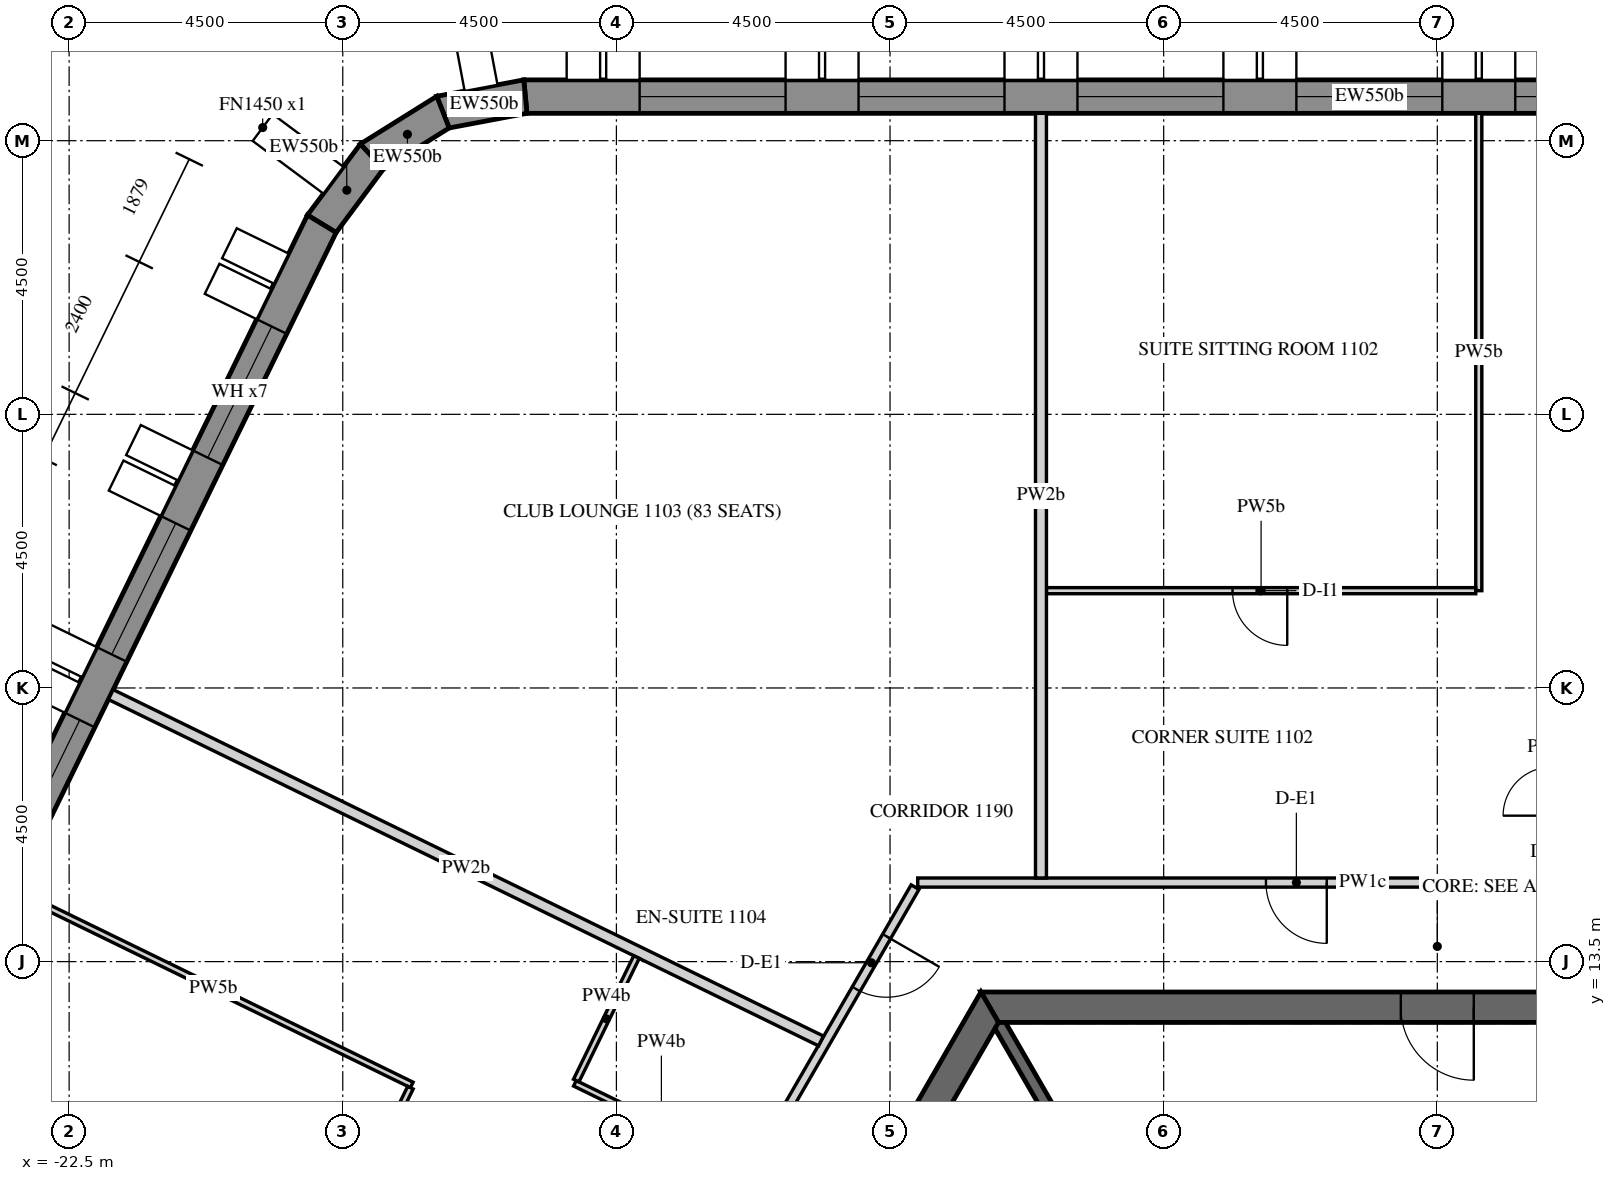
"""IFC4 building model, lengths in metres.
Left out: names, types, materials, properties, quantities, classifications, styles, units other than length and angle.
Written with IfcOpenShell. Run it as: python <this file> out.ifc"""

import sys

from ifc_helpers import new_model, si_unit, direction, frame, frame_2d, origin, place, context, subcontext, project, spatial, polyline, rectangle, outline, extrude, element, fill, save


model = new_model("IFC4")
c1 = context("Model", 3, precision=1e-05, world=origin(), true_north=direction((0.0, 1.0)))
c2 = subcontext(c1, "Body", "Model", "MODEL_VIEW")
j1 = project(units=[si_unit("LENGTHUNIT", "METRE"), si_unit("PLANEANGLEUNIT", "RADIAN")], contexts=[c1])
p1 = place(None, origin())
s1 = spatial("IfcSite", under=j1, at=p1, CompositionType="ELEMENT")
p2 = place(p1, origin())
s2 = spatial("IfcBuilding", under=s1, at=p2, CompositionType="ELEMENT")
p3 = place(p2, frame((0.0, 0.0, 152.7)))
s3 = spatial("IfcBuildingStorey", under=s2, at=p3, CompositionType="ELEMENT", Elevation=152.7)
p4 = place(p3, frame((12.761, 27.725, 0.0), z_axis=(0.0, 0.0, 1.0), x_axis=(-1.0, 0.0, 0.0)))
e1 = element("IfcWall", 1, at=p4, inside=s3, PredefinedType="SOLIDWALL", context=c2, shape_type="SweptSolid", body=[
    extrude(outline(polyline([(-0.022, -0.275), (27.783, -0.275), (27.732, 0.275), (0.022, 0.275), (-0.022, -0.275)])), origin(), (0.0, 0.0, 1.0), 3.75),
])
p5 = place(p4, frame((1.879, 0.0, 0.9)))
e2 = element("IfcOpeningElement", 2, at=p5, cuts=e1, PredefinedType="OPENING", context=c2, shape_type="SweptSolid", body=[
    extrude(rectangle(XDim=2.4, YDim=2.4, at=frame_2d((1.2, 1.2))), frame((0.0, 0.285, 0.0), z_axis=(0.0, -1.0, 0.0), x_axis=(1.0, 0.0, 0.0)), (0.0, 0.0, 1.0), 0.57),
])
p6 = place(p4, frame((5.479, 0.0, 0.9)))
e3 = element("IfcOpeningElement", 3, at=p6, cuts=e1, PredefinedType="OPENING", context=c2, shape_type="SweptSolid", body=[
    extrude(rectangle(XDim=2.4, YDim=2.4, at=frame_2d((1.2, 1.2))), frame((0.0, 0.285, 0.0), z_axis=(0.0, -1.0, 0.0), x_axis=(1.0, 0.0, 0.0)), (0.0, 0.0, 1.0), 0.57),
])
p7 = place(p4, frame((9.079, 0.0, 0.9)))
e4 = element("IfcOpeningElement", 4, at=p7, cuts=e1, PredefinedType="OPENING", context=c2, shape_type="SweptSolid", body=[
    extrude(rectangle(XDim=2.4, YDim=2.4, at=frame_2d((1.2, 1.2))), frame((0.0, 0.285, 0.0), z_axis=(0.0, -1.0, 0.0), x_axis=(1.0, 0.0, 0.0)), (0.0, 0.0, 1.0), 0.57),
])
p8 = place(p4, frame((12.679, 0.0, 0.9)))
e5 = element("IfcOpeningElement", 5, at=p8, cuts=e1, PredefinedType="OPENING", context=c2, shape_type="SweptSolid", body=[
    extrude(rectangle(XDim=2.4, YDim=2.4, at=frame_2d((1.2, 1.2))), frame((0.0, 0.285, 0.0), z_axis=(0.0, -1.0, 0.0), x_axis=(1.0, 0.0, 0.0)), (0.0, 0.0, 1.0), 0.57),
])
p9 = place(p4, frame((16.279, 0.0, 0.9)))
e6 = element("IfcOpeningElement", 6, at=p9, cuts=e1, PredefinedType="OPENING", context=c2, shape_type="SweptSolid", body=[
    extrude(rectangle(XDim=2.4, YDim=2.4, at=frame_2d((1.2, 1.2))), frame((0.0, 0.285, 0.0), z_axis=(0.0, -1.0, 0.0), x_axis=(1.0, 0.0, 0.0)), (0.0, 0.0, 1.0), 0.57),
])
p10 = place(p4, frame((19.879, 0.0, 0.9)))
e7 = element("IfcOpeningElement", 7, at=p10, cuts=e1, PredefinedType="OPENING", context=c2, shape_type="SweptSolid", body=[
    extrude(rectangle(XDim=2.4, YDim=2.4, at=frame_2d((1.2, 1.2))), frame((0.0, 0.285, 0.0), z_axis=(0.0, -1.0, 0.0), x_axis=(1.0, 0.0, 0.0)), (0.0, 0.0, 1.0), 0.57),
])
p11 = place(p4, frame((23.479, 0.0, 0.9)))
e8 = element("IfcOpeningElement", 8, at=p11, cuts=e1, PredefinedType="OPENING", context=c2, shape_type="SweptSolid", body=[
    extrude(rectangle(XDim=2.4, YDim=2.4, at=frame_2d((1.2, 1.2))), frame((0.0, 0.285, 0.0), z_axis=(0.0, -1.0, 0.0), x_axis=(1.0, 0.0, 0.0)), (0.0, 0.0, 1.0), 0.57),
])
p12 = place(p3, frame((-14.997, 27.725, 0.0), z_axis=(0.0, 0.0, 1.0), x_axis=(-0.982705443133, -0.185175624845, 0.0)))
e9 = element("IfcWall", 9, at=p12, inside=s3, PredefinedType="SOLIDWALL", context=c2, shape_type="SweptSolid", body=[
    extrude(outline(polyline([(-0.026, -0.275), (1.431, -0.275), (1.327, 0.275), (0.026, 0.275), (-0.026, -0.275)])), origin(), (0.0, 0.0, 1.0), 3.75),
])
p13 = place(p3, frame((-16.352, 27.47, 0.0), z_axis=(0.0, 0.0, 1.0), x_axis=(-0.848057977594, -0.5299034503, 0.0)))
e10 = element("IfcWall", 10, at=p13, inside=s3, PredefinedType="SOLIDWALL", context=c2, shape_type="SweptSolid", body=[
    extrude(outline(polyline([(-0.052, -0.275), (1.431, -0.275), (1.327, 0.275), (0.052, 0.275), (-0.052, -0.275)])), origin(), (0.0, 0.0, 1.0), 3.75),
])
p14 = place(p3, frame((-17.521, 26.739, 0.0), z_axis=(0.0, 0.0, 1.0), x_axis=(-0.597135295884, -0.802140535324, 0.0)))
e11 = element("IfcWall", 11, at=p14, inside=s3, PredefinedType="SOLIDWALL", context=c2, shape_type="SweptSolid", body=[
    extrude(outline(polyline([(-0.052, -0.275), (1.405, -0.275), (1.354, 0.275), (0.052, 0.275), (-0.052, -0.275)])), origin(), (0.0, 0.0, 1.0), 3.75),
])
p15 = place(p3, frame((-18.345, 25.633, 0.0), z_axis=(0.0, 0.0, 1.0), x_axis=(-0.43837181828, -0.898793718791, 0.0)))
e12 = element("IfcWall", 12, at=p15, inside=s3, PredefinedType="SOLIDWALL", context=c2, shape_type="SweptSolid", body=[
    extrude(outline(polyline([(-0.026, -0.275), (27.78, -0.275), (27.735, 0.275), (0.026, 0.275), (-0.026, -0.275)])), origin(), (0.0, 0.0, 1.0), 3.75),
])
p16 = place(p15, frame((1.879, 0.0, 0.9)))
e13 = element("IfcOpeningElement", 13, at=p16, cuts=e12, PredefinedType="OPENING", context=c2, shape_type="SweptSolid", body=[
    extrude(rectangle(XDim=2.4, YDim=2.4, at=frame_2d((1.2, 1.2))), frame((0.0, 0.285, 0.0), z_axis=(0.0, -1.0, 0.0), x_axis=(1.0, 0.0, 0.0)), (0.0, 0.0, 1.0), 0.57),
])
p17 = place(p15, frame((5.479, 0.0, 0.9)))
e14 = element("IfcOpeningElement", 14, at=p17, cuts=e12, PredefinedType="OPENING", context=c2, shape_type="SweptSolid", body=[
    extrude(rectangle(XDim=2.4, YDim=2.4, at=frame_2d((1.2, 1.2))), frame((0.0, 0.285, 0.0), z_axis=(0.0, -1.0, 0.0), x_axis=(1.0, 0.0, 0.0)), (0.0, 0.0, 1.0), 0.57),
])
p18 = place(p15, frame((9.079, 0.0, 0.9)))
e15 = element("IfcOpeningElement", 15, at=p18, cuts=e12, PredefinedType="OPENING", context=c2, shape_type="SweptSolid", body=[
    extrude(rectangle(XDim=2.4, YDim=2.4, at=frame_2d((1.2, 1.2))), frame((0.0, 0.285, 0.0), z_axis=(0.0, -1.0, 0.0), x_axis=(1.0, 0.0, 0.0)), (0.0, 0.0, 1.0), 0.57),
])
p19 = place(p15, frame((12.679, 0.0, 0.9)))
e16 = element("IfcOpeningElement", 16, at=p19, cuts=e12, PredefinedType="OPENING", context=c2, shape_type="SweptSolid", body=[
    extrude(rectangle(XDim=2.4, YDim=2.4, at=frame_2d((1.2, 1.2))), frame((0.0, 0.285, 0.0), z_axis=(0.0, -1.0, 0.0), x_axis=(1.0, 0.0, 0.0)), (0.0, 0.0, 1.0), 0.57),
])
p20 = place(p15, frame((16.279, 0.0, 0.9)))
e17 = element("IfcOpeningElement", 17, at=p20, cuts=e12, PredefinedType="OPENING", context=c2, shape_type="SweptSolid", body=[
    extrude(rectangle(XDim=2.4, YDim=2.4, at=frame_2d((1.2, 1.2))), frame((0.0, 0.285, 0.0), z_axis=(0.0, -1.0, 0.0), x_axis=(1.0, 0.0, 0.0)), (0.0, 0.0, 1.0), 0.57),
])
p21 = place(p15, frame((19.879, 0.0, 0.9)))
e18 = element("IfcOpeningElement", 18, at=p21, cuts=e12, PredefinedType="OPENING", context=c2, shape_type="SweptSolid", body=[
    extrude(rectangle(XDim=2.4, YDim=2.4, at=frame_2d((1.2, 1.2))), frame((0.0, 0.285, 0.0), z_axis=(0.0, -1.0, 0.0), x_axis=(1.0, 0.0, 0.0)), (0.0, 0.0, 1.0), 0.57),
])
p22 = place(p15, frame((23.479, 0.0, 0.9)))
e19 = element("IfcOpeningElement", 19, at=p22, cuts=e12, PredefinedType="OPENING", context=c2, shape_type="SweptSolid", body=[
    extrude(rectangle(XDim=2.4, YDim=2.4, at=frame_2d((1.2, 1.2))), frame((0.0, 0.285, 0.0), z_axis=(0.0, -1.0, 0.0), x_axis=(1.0, 0.0, 0.0)), (0.0, 0.0, 1.0), 0.57),
])
p23 = place(p3, frame((-7.361, 12.75, 0.0), z_axis=(0.0, 0.0, 1.0), x_axis=(-0.50000571537, -0.866022103989, 0.0)))
e20 = element("IfcWall", 20, at=p23, inside=s3, PredefinedType="SHEAR", context=c2, shape_type="SweptSolid", body=[
    extrude(outline(polyline([(-0.144, -0.25), (14.867, -0.25), (14.578, 0.25), (0.144, 0.25), (-0.144, -0.25)])), origin(), (0.0, 0.0, 1.0), 3.75),
])
p24 = place(p23, frame((6.49, 0.0, 0.0)))
e21 = element("IfcOpeningElement", 21, at=p24, cuts=e20, PredefinedType="OPENING", context=c2, shape_type="SweptSolid", body=[
    extrude(rectangle(XDim=1.8, YDim=2.4, at=frame_2d((0.9, 1.2))), frame((0.0, 0.26, 0.0), z_axis=(0.0, -1.0, 0.0), x_axis=(1.0, 0.0, 0.0)), (0.0, 0.0, 1.0), 0.52),
])
p25 = place(p3, frame((7.361, 12.75, 0.0), z_axis=(0.0, 0.0, 1.0), x_axis=(-1.0, 0.0, 0.0)))
e22 = element("IfcWall", 22, at=p25, inside=s3, PredefinedType="SHEAR", context=c2, shape_type="SweptSolid", body=[
    extrude(outline(polyline([(-0.144, -0.25), (14.866, -0.25), (14.578, 0.25), (0.144, 0.25), (-0.144, -0.25)])), origin(), (0.0, 0.0, 1.0), 3.75),
])
p26 = place(p25, frame((6.761, 0.0, 0.0)))
e23 = element("IfcOpeningElement", 23, at=p26, cuts=e22, PredefinedType="OPENING", context=c2, shape_type="SweptSolid", body=[
    extrude(rectangle(XDim=1.2, YDim=2.4, at=frame_2d((0.6, 1.2))), frame((0.0, 0.26, 0.0), z_axis=(0.0, -1.0, 0.0), x_axis=(1.0, 0.0, 0.0)), (0.0, 0.0, 1.0), 0.52),
])
p27 = place(p3, frame((-5.773, 10.0, 0.0), z_axis=(0.0, 0.0, 1.0), x_axis=(-0.499995765644, 0.866027848477, 0.0)))
e24 = element("IfcWall", 24, at=p27, inside=s3, PredefinedType="SHEAR", context=c2, shape_type="SweptSolid", body=[
    extrude(rectangle(XDim=2.887, YDim=0.2, at=frame_2d((1.443, 0.0))), origin(), (0.0, 0.0, 1.0), 3.75),
])
p28 = place(p3, frame((6.091, 14.8, 0.0), z_axis=(0.0, 0.0, 1.0), x_axis=(-1.0, 0.0, 0.0)))
e25 = element("IfcWall", 25, at=p28, inside=s3, PredefinedType="PARTITIONING", context=c2, shape_type="SweptSolid", body=[
    extrude(rectangle(XDim=14.636, YDim=0.15, at=frame_2d((7.318, 0.0))), origin(), (0.0, 0.0, 1.0), 2.823),
])
p29 = place(p28, frame((7.909, 0.0, 0.0)))
e26 = element("IfcOpeningElement", 26, at=p29, cuts=e25, PredefinedType="OPENING", context=c2, shape_type="SweptSolid", body=[
    extrude(rectangle(XDim=1.0, YDim=2.1, at=frame_2d((0.5, 1.05))), frame((0.0, 0.085, 0.0), z_axis=(0.0, -1.0, 0.0), x_axis=(1.0, 0.0, 0.0)), (0.0, 0.0, 1.0), 0.17),
])
p30 = place(p3, frame((-8.588, 14.725, 0.0), z_axis=(0.0, 0.0, 1.0), x_axis=(-0.499996322767, -0.866027526826, 0.0)))
e27 = element("IfcWall", 27, at=p30, inside=s3, PredefinedType="PARTITIONING", context=c2, shape_type="SweptSolid", body=[
    extrude(rectangle(XDim=14.636, YDim=0.15, at=frame_2d((7.318, 0.0))), origin(), (0.0, 0.0, 1.0), 2.823),
])
p31 = place(p30, frame((0.936, 0.0, 0.0)))
e28 = element("IfcOpeningElement", 28, at=p31, cuts=e27, PredefinedType="OPENING", context=c2, shape_type="SweptSolid", body=[
    extrude(rectangle(XDim=1.0, YDim=2.1, at=frame_2d((0.5, 1.05))), frame((0.0, 0.085, 0.0), z_axis=(0.0, -1.0, 0.0), x_axis=(1.0, 0.0, 0.0)), (0.0, 0.0, 1.0), 0.17),
])
p32 = place(p30, frame((9.495, 0.0, 0.0)))
e29 = element("IfcOpeningElement", 29, at=p32, cuts=e27, PredefinedType="OPENING", context=c2, shape_type="SweptSolid", body=[
    extrude(rectangle(XDim=1.0, YDim=2.1, at=frame_2d((0.5, 1.05))), frame((0.0, 0.085, 0.0), z_axis=(0.0, -1.0, 0.0), x_axis=(1.0, 0.0, 0.0)), (0.0, 0.0, 1.0), 0.17),
])
p33 = place(p3, frame((0.682, 27.45, 0.0), z_axis=(0.0, 0.0, 1.0), x_axis=(0.0, -1.0, 0.0)))
e30 = element("IfcWall", 30, at=p33, inside=s3, PredefinedType="PARTITIONING", context=c2, shape_type="SweptSolid", body=[
    extrude(rectangle(XDim=7.85, YDim=0.1, at=frame_2d((3.925, 0.0))), origin(), (0.0, 0.0, 1.0), 2.823),
])
p34 = place(p3, frame((0.632, 19.6, 0.0), z_axis=(0.0, 0.0, 1.0), x_axis=(-1.0, 0.0, 0.0)))
e31 = element("IfcWall", 31, at=p34, inside=s3, PredefinedType="PARTITIONING", context=c2, shape_type="SweptSolid", body=[
    extrude(rectangle(XDim=7.06, YDim=0.1, at=frame_2d((3.53, 0.0))), origin(), (0.0, 0.0, 1.0), 2.823),
])
p35 = place(p34, frame((3.1, 0.0, 0.0)))
e32 = element("IfcOpeningElement", 32, at=p35, cuts=e31, PredefinedType="OPENING", context=c2, shape_type="SweptSolid", body=[
    extrude(rectangle(XDim=0.9, YDim=2.1, at=frame_2d((0.45, 1.05))), frame((0.0, 0.06, 0.0), z_axis=(0.0, -1.0, 0.0), x_axis=(1.0, 0.0, 0.0)), (0.0, 0.0, 1.0), 0.12),
])
p36 = place(p3, frame((-6.518, 27.45, 0.0), z_axis=(0.0, 0.0, 1.0), x_axis=(0.0, -1.0, 0.0)))
e33 = element("IfcWall", 33, at=p36, inside=s3, PredefinedType="PARTITIONING", context=c2, shape_type="SweptSolid", body=[
    extrude(rectangle(XDim=12.575, YDim=0.18, at=frame_2d((6.288, 0.0))), origin(), (0.0, 0.0, 1.0), 2.823),
])
p37 = place(p3, frame((-21.815, 17.892, 0.0), z_axis=(0.0, 0.0, 1.0), x_axis=(0.898798778742, -0.43836144371, 0.0)))
e34 = element("IfcWall", 34, at=p37, inside=s3, PredefinedType="PARTITIONING", context=c2, shape_type="SweptSolid", body=[
    extrude(rectangle(XDim=12.994, YDim=0.18, at=frame_2d((6.497, 0.0))), origin(), (0.0, 0.0, 1.0), 2.823),
])
p38 = place(p3, frame((-11.338, 10.112, 0.0), z_axis=(0.0, 0.0, 1.0), x_axis=(-0.898781792608, 0.438396269688, 0.0)))
e35 = element("IfcWall", 35, at=p38, inside=s3, PredefinedType="PARTITIONING", context=c2, shape_type="SweptSolid", body=[
    extrude(rectangle(XDim=3.164, YDim=0.1, at=frame_2d((1.582, 0.0))), origin(), (0.0, 0.0, 1.0), 2.823),
])
p39 = place(p38, frame((1.264, 0.0, 0.0)))
e36 = element("IfcOpeningElement", 36, at=p39, cuts=e35, PredefinedType="OPENING", context=c2, shape_type="SweptSolid", body=[
    extrude(rectangle(XDim=0.8, YDim=2.1, at=frame_2d((0.4, 1.05))), frame((0.0, 0.06, 0.0), z_axis=(0.0, -1.0, 0.0), x_axis=(1.0, 0.0, 0.0)), (0.0, 0.0, 1.0), 0.12),
])
p40 = place(p3, frame((-14.16, 11.544, 0.0), z_axis=(0.0, 0.0, 1.0), x_axis=(0.438376807268, 0.898791285477, 0.0)))
e37 = element("IfcWall", 37, at=p40, inside=s3, PredefinedType="PARTITIONING", context=c2, shape_type="SweptSolid", body=[
    extrude(rectangle(XDim=2.26, YDim=0.1, at=frame_2d((1.13, 0.0))), origin(), (0.0, 0.0, 1.0), 2.823),
])
p41 = place(p3, frame((-23.393, 14.656, 0.0), z_axis=(0.0, 0.0, 1.0), x_axis=(0.898794291179, -0.43837064471, 0.0)))
e38 = element("IfcWall", 38, at=p41, inside=s3, PredefinedType="PARTITIONING", context=c2, shape_type="SweptSolid", body=[
    extrude(rectangle(XDim=7.262, YDim=0.1, at=frame_2d((3.631, 0.0))), origin(), (0.0, 0.0, 1.0), 2.823),
])
p42 = place(p3, frame((-16.887, 11.427, 0.0), z_axis=(0.0, 0.0, 1.0), x_axis=(-0.438369721011, -0.898794741696, 0.0)))
e39 = element("IfcWall", 39, at=p42, inside=s3, PredefinedType="PARTITIONING", context=c2, shape_type="SweptSolid", body=[
    extrude(rectangle(XDim=10.35, YDim=0.1, at=frame_2d((5.175, 0.0))), origin(), (0.0, 0.0, 1.0), 2.823),
])
p43 = place(p42, frame((4.9, 0.0, 0.0)))
e40 = element("IfcOpeningElement", 40, at=p43, cuts=e39, PredefinedType="OPENING", context=c2, shape_type="SweptSolid", body=[
    extrude(rectangle(XDim=0.9, YDim=2.1, at=frame_2d((0.45, 1.05))), frame((0.0, 0.06, 0.0), z_axis=(0.0, -1.0, 0.0), x_axis=(1.0, 0.0, 0.0)), (0.0, 0.0, 1.0), 0.12),
])
p44 = place(p7, frame((0.0, 0.205, 0.0)))
e41 = element("IfcWindow", 41, at=p44, inside=s3, PartitioningType="DOUBLE_PANEL_VERTICAL", PredefinedType="WINDOW", context=c2, shape_type="SweptSolid", body=[
    extrude(rectangle(XDim=2.4, YDim=2.4, at=frame_2d((1.2, 1.2))), frame((0.0, 0.03, 0.0), z_axis=(0.0, -1.0, 0.0), x_axis=(1.0, 0.0, 0.0)), (0.0, 0.0, 1.0), 0.06),
])
fill(e4, e41)
p45 = place(p8, frame((0.0, 0.205, 0.0)))
e42 = element("IfcWindow", 42, at=p45, inside=s3, PartitioningType="DOUBLE_PANEL_VERTICAL", PredefinedType="WINDOW", context=c2, shape_type="SweptSolid", body=[
    extrude(rectangle(XDim=2.4, YDim=2.4, at=frame_2d((1.2, 1.2))), frame((0.0, 0.03, 0.0), z_axis=(0.0, -1.0, 0.0), x_axis=(1.0, 0.0, 0.0)), (0.0, 0.0, 1.0), 0.06),
])
fill(e5, e42)
p46 = place(p9, frame((0.0, 0.205, 0.0)))
e43 = element("IfcWindow", 43, at=p46, inside=s3, PartitioningType="DOUBLE_PANEL_VERTICAL", PredefinedType="WINDOW", context=c2, shape_type="SweptSolid", body=[
    extrude(rectangle(XDim=2.4, YDim=2.4, at=frame_2d((1.2, 1.2))), frame((0.0, 0.03, 0.0), z_axis=(0.0, -1.0, 0.0), x_axis=(1.0, 0.0, 0.0)), (0.0, 0.0, 1.0), 0.06),
])
fill(e6, e43)
p47 = place(p10, frame((0.0, 0.205, 0.0)))
e44 = element("IfcWindow", 44, at=p47, inside=s3, PartitioningType="DOUBLE_PANEL_VERTICAL", PredefinedType="WINDOW", context=c2, shape_type="SweptSolid", body=[
    extrude(rectangle(XDim=2.4, YDim=2.4, at=frame_2d((1.2, 1.2))), frame((0.0, 0.03, 0.0), z_axis=(0.0, -1.0, 0.0), x_axis=(1.0, 0.0, 0.0)), (0.0, 0.0, 1.0), 0.06),
])
fill(e7, e44)
p48 = place(p11, frame((0.0, 0.205, 0.0)))
e45 = element("IfcWindow", 45, at=p48, inside=s3, PartitioningType="DOUBLE_PANEL_VERTICAL", PredefinedType="WINDOW", context=c2, shape_type="SweptSolid", body=[
    extrude(rectangle(XDim=2.4, YDim=2.4, at=frame_2d((1.2, 1.2))), frame((0.0, 0.03, 0.0), z_axis=(0.0, -1.0, 0.0), x_axis=(1.0, 0.0, 0.0)), (0.0, 0.0, 1.0), 0.06),
])
fill(e8, e45)
p49 = place(p16, frame((0.0, 0.205, 0.0)))
e46 = element("IfcWindow", 46, at=p49, inside=s3, PartitioningType="DOUBLE_PANEL_VERTICAL", PredefinedType="WINDOW", context=c2, shape_type="SweptSolid", body=[
    extrude(rectangle(XDim=2.4, YDim=2.4, at=frame_2d((1.2, 1.2))), frame((0.0, 0.03, 0.0), z_axis=(0.0, -1.0, 0.0), x_axis=(1.0, 0.0, 0.0)), (0.0, 0.0, 1.0), 0.06),
])
fill(e13, e46)
p50 = place(p17, frame((0.0, 0.205, 0.0)))
e47 = element("IfcWindow", 47, at=p50, inside=s3, PartitioningType="DOUBLE_PANEL_VERTICAL", PredefinedType="WINDOW", context=c2, shape_type="SweptSolid", body=[
    extrude(rectangle(XDim=2.4, YDim=2.4, at=frame_2d((1.2, 1.2))), frame((0.0, 0.03, 0.0), z_axis=(0.0, -1.0, 0.0), x_axis=(1.0, 0.0, 0.0)), (0.0, 0.0, 1.0), 0.06),
])
fill(e14, e47)
p51 = place(p18, frame((0.0, 0.205, 0.0)))
e48 = element("IfcWindow", 48, at=p51, inside=s3, PartitioningType="DOUBLE_PANEL_VERTICAL", PredefinedType="WINDOW", context=c2, shape_type="SweptSolid", body=[
    extrude(rectangle(XDim=2.4, YDim=2.4, at=frame_2d((1.2, 1.2))), frame((0.0, 0.03, 0.0), z_axis=(0.0, -1.0, 0.0), x_axis=(1.0, 0.0, 0.0)), (0.0, 0.0, 1.0), 0.06),
])
fill(e15, e48)
p52 = place(p26, origin())
e49 = element("IfcDoor", 49, at=p52, inside=s3, OperationType="SINGLE_SWING_LEFT", PredefinedType="DOOR", context=c2, shape_type="SweptSolid", body=[
    extrude(rectangle(XDim=1.2, YDim=2.4, at=frame_2d((0.6, 1.2))), frame((0.0, 0.025, 0.0), z_axis=(0.0, -1.0, 0.0), x_axis=(1.0, 0.0, 0.0)), (0.0, 0.0, 1.0), 0.05),
])
fill(e23, e49)
p53 = place(p29, origin())
e50 = element("IfcDoor", 50, at=p53, inside=s3, OperationType="SINGLE_SWING_RIGHT", PredefinedType="DOOR", context=c2, shape_type="SweptSolid", body=[
    extrude(rectangle(XDim=1.0, YDim=2.1, at=frame_2d((0.5, 1.05))), frame((0.0, 0.025, 0.0), z_axis=(0.0, -1.0, 0.0), x_axis=(1.0, 0.0, 0.0)), (0.0, 0.0, 1.0), 0.05),
])
fill(e26, e50)
p54 = place(p35, origin())
e51 = element("IfcDoor", 51, at=p54, inside=s3, OperationType="SINGLE_SWING_RIGHT", PredefinedType="DOOR", context=c2, shape_type="SweptSolid", body=[
    extrude(rectangle(XDim=0.9, YDim=2.1, at=frame_2d((0.45, 1.05))), frame((0.0, 0.025, 0.0), z_axis=(0.0, -1.0, 0.0), x_axis=(1.0, 0.0, 0.0)), (0.0, 0.0, 1.0), 0.05),
])
fill(e32, e51)
p55 = place(p31, origin())
e52 = element("IfcDoor", 52, at=p55, inside=s3, OperationType="SINGLE_SWING_RIGHT", PredefinedType="DOOR", context=c2, shape_type="SweptSolid", body=[
    extrude(rectangle(XDim=1.0, YDim=2.1, at=frame_2d((0.5, 1.05))), frame((0.0, 0.025, 0.0), z_axis=(0.0, -1.0, 0.0), x_axis=(1.0, 0.0, 0.0)), (0.0, 0.0, 1.0), 0.05),
])
fill(e28, e52)
save(model, sys.argv[1])
